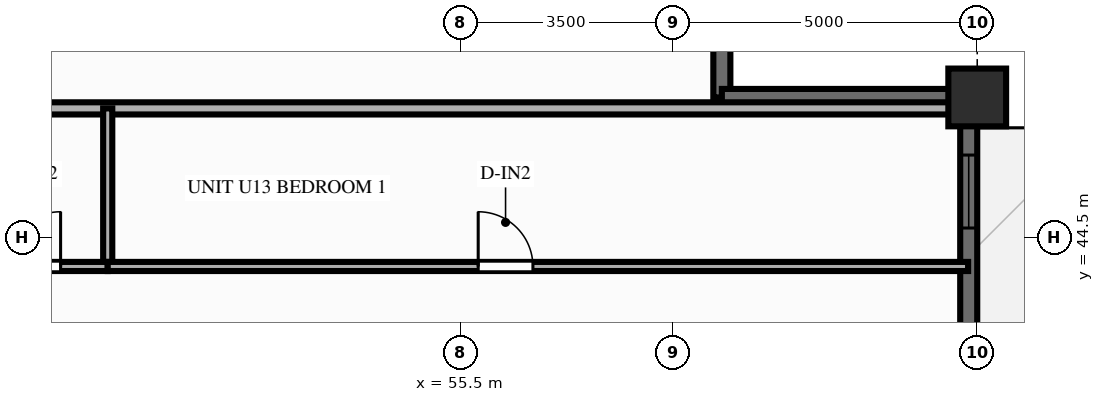
"""IFC4 building model, lengths in metres.
Left out: names, types, materials, properties, quantities, classifications, styles, units other than length and angle.
Written with IfcOpenShell. Run it as: python <this file> out.ifc"""

import sys

from ifc_helpers import new_model, si_unit, direction, frame, frame_2d, origin, origin_2d, place, context, subcontext, project, spatial, rectangle, extrude, source, transform, mapped, element, fill, save


model = new_model("IFC4")
c1 = context("Model", 3, precision=1e-05, world=origin(), true_north=direction((0.0, 1.0)))
c2 = subcontext(c1, "Body", "Model", "MODEL_VIEW")
j1 = project(units=[si_unit("LENGTHUNIT", "METRE"), si_unit("PLANEANGLEUNIT", "RADIAN")], contexts=[c1])
p1 = place(None, origin())
s1 = spatial("IfcSite", under=j1, at=p1, CompositionType="ELEMENT")
p2 = place(p1, origin())
s2 = spatial("IfcBuilding", under=s1, at=p2, CompositionType="ELEMENT")
p3 = place(p2, frame((0.0, 0.0, 110.85)))
s3 = spatial("IfcBuildingStorey", under=s2, at=p3, CompositionType="ELEMENT", Elevation=110.85)
m1 = source(origin(), c2, "Body", "SweptSolid", [
    extrude(rectangle(XDim=0.95, YDim=0.95, at=origin_2d()), origin(), (0.0, 0.0, 1.0), 3.0),
])
p4 = place(p3, frame((64.0, 46.8, 0.0), z_axis=(0.0, 0.0, 1.0), x_axis=(1.0, 0.0, 0.0)))
e1 = element("IfcColumn", 1, at=p4, inside=s3, PredefinedType="COLUMN", context=c2, shape_type="MappedRepresentation", body=[
    mapped(m1, transform((0.0, 0.0, 0.0), scale=1.0)),
])
p5 = place(p3, frame((63.86, 7.2, 0.0), z_axis=(0.0, 0.0, 1.0), x_axis=(0.0, 1.0, 0.0)))
e2 = element("IfcWall", 2, at=p5, inside=s3, PredefinedType="SOLIDWALL", context=c2, shape_type="SweptSolid", body=[
    extrude(rectangle(XDim=39.6, YDim=0.28, at=frame_2d((19.8, 0.0))), origin(), (0.0, 0.0, 1.0), 2.28),
])
p6 = place(p5, frame((0.945, 0.0, 0.25)))
e3 = element("IfcOpeningElement", 3, at=p6, cuts=e2, PredefinedType="OPENING", context=c2, shape_type="SweptSolid", body=[
    extrude(rectangle(XDim=1.2, YDim=1.5, at=frame_2d((0.6, 0.75))), frame((0.0, 0.152, 0.0), z_axis=(0.0, -1.0, 0.0), x_axis=(1.0, 0.0, 0.0)), (0.0, 0.0, 1.0), 0.304),
])
p7 = place(p5, frame((4.213, 0.0, 0.25)))
e4 = element("IfcOpeningElement", 4, at=p7, cuts=e2, PredefinedType="OPENING", context=c2, shape_type="SweptSolid", body=[
    extrude(rectangle(XDim=1.2, YDim=1.5, at=frame_2d((0.6, 0.75))), frame((0.0, 0.152, 0.0), z_axis=(0.0, -1.0, 0.0), x_axis=(1.0, 0.0, 0.0)), (0.0, 0.0, 1.0), 0.304),
])
p8 = place(p5, frame((7.55, 0.0, 0.25)))
e5 = element("IfcOpeningElement", 5, at=p8, cuts=e2, PredefinedType="OPENING", context=c2, shape_type="SweptSolid", body=[
    extrude(rectangle(XDim=1.2, YDim=1.5, at=frame_2d((0.6, 0.75))), frame((0.0, 0.152, 0.0), z_axis=(0.0, -1.0, 0.0), x_axis=(1.0, 0.0, 0.0)), (0.0, 0.0, 1.0), 0.304),
])
p9 = place(p5, frame((13.483, 0.0, 0.25)))
e6 = element("IfcOpeningElement", 6, at=p9, cuts=e2, PredefinedType="OPENING", context=c2, shape_type="SweptSolid", body=[
    extrude(rectangle(XDim=1.2, YDim=1.5, at=frame_2d((0.6, 0.75))), frame((0.0, 0.152, 0.0), z_axis=(0.0, -1.0, 0.0), x_axis=(1.0, 0.0, 0.0)), (0.0, 0.0, 1.0), 0.304),
])
p10 = place(p5, frame((16.82, 0.0, 0.25)))
e7 = element("IfcOpeningElement", 7, at=p10, cuts=e2, PredefinedType="OPENING", context=c2, shape_type="SweptSolid", body=[
    extrude(rectangle(XDim=1.2, YDim=1.5, at=frame_2d((0.6, 0.75))), frame((0.0, 0.152, 0.0), z_axis=(0.0, -1.0, 0.0), x_axis=(1.0, 0.0, 0.0)), (0.0, 0.0, 1.0), 0.304),
])
p11 = place(p5, frame((19.2, 0.0, 0.25)))
e8 = element("IfcOpeningElement", 8, at=p11, cuts=e2, PredefinedType="OPENING", context=c2, shape_type="SweptSolid", body=[
    extrude(rectangle(XDim=1.2, YDim=1.5, at=frame_2d((0.6, 0.75))), frame((0.0, 0.152, 0.0), z_axis=(0.0, -1.0, 0.0), x_axis=(1.0, 0.0, 0.0)), (0.0, 0.0, 1.0), 0.304),
])
p12 = place(p5, frame((21.578, 0.0, 0.25)))
e9 = element("IfcOpeningElement", 9, at=p12, cuts=e2, PredefinedType="OPENING", context=c2, shape_type="SweptSolid", body=[
    extrude(rectangle(XDim=1.2, YDim=1.5, at=frame_2d((0.6, 0.75))), frame((0.0, 0.152, 0.0), z_axis=(0.0, -1.0, 0.0), x_axis=(1.0, 0.0, 0.0)), (0.0, 0.0, 1.0), 0.304),
])
p13 = place(p5, frame((26.313, 0.0, 0.0), z_axis=(0.0, 0.0, 1.0), x_axis=(-1.0, 0.0, 0.0)))
e10 = element("IfcOpeningElement", 10, at=p13, cuts=e2, PredefinedType="OPENING", context=c2, shape_type="SweptSolid", body=[
    extrude(rectangle(XDim=1.6, YDim=2.15, at=frame_2d((0.8, 1.075))), frame((0.0, 0.152, 0.0), z_axis=(0.0, -1.0, 0.0), x_axis=(1.0, 0.0, 0.0)), (0.0, 0.0, 1.0), 0.304),
])
p14 = place(p5, frame((29.305, 0.0, 0.25)))
e11 = element("IfcOpeningElement", 11, at=p14, cuts=e2, PredefinedType="OPENING", context=c2, shape_type="SweptSolid", body=[
    extrude(rectangle(XDim=0.7, YDim=1.5, at=frame_2d((0.35, 0.75))), frame((0.0, 0.152, 0.0), z_axis=(0.0, -1.0, 0.0), x_axis=(1.0, 0.0, 0.0)), (0.0, 0.0, 1.0), 0.304),
])
p15 = place(p5, frame((30.848, 0.0, 0.25)))
e12 = element("IfcOpeningElement", 12, at=p15, cuts=e2, PredefinedType="OPENING", context=c2, shape_type="SweptSolid", body=[
    extrude(rectangle(XDim=1.2, YDim=1.5, at=frame_2d((0.6, 0.75))), frame((0.0, 0.152, 0.0), z_axis=(0.0, -1.0, 0.0), x_axis=(1.0, 0.0, 0.0)), (0.0, 0.0, 1.0), 0.304),
])
p16 = place(p5, frame((34.183, 0.0, 0.25)))
e13 = element("IfcOpeningElement", 13, at=p16, cuts=e2, PredefinedType="OPENING", context=c2, shape_type="SweptSolid", body=[
    extrude(rectangle(XDim=1.2, YDim=1.5, at=frame_2d((0.6, 0.75))), frame((0.0, 0.152, 0.0), z_axis=(0.0, -1.0, 0.0), x_axis=(1.0, 0.0, 0.0)), (0.0, 0.0, 1.0), 0.304),
])
p17 = place(p5, frame((37.452, 0.0, 0.25)))
e14 = element("IfcOpeningElement", 14, at=p17, cuts=e2, PredefinedType="OPENING", context=c2, shape_type="SweptSolid", body=[
    extrude(rectangle(XDim=1.2, YDim=1.5, at=frame_2d((0.6, 0.75))), frame((0.0, 0.152, 0.0), z_axis=(0.0, -1.0, 0.0), x_axis=(1.0, 0.0, 0.0)), (0.0, 0.0, 1.0), 0.304),
])
for number, where, z_axis, x_axis in (
    (15, (59.8, 46.8, 0.0), (0.0, 0.0, 1.0), (0.0, 1.0, 0.0)),
    (16, (59.8, 46.8, 0.0), (0.0, 0.0, 1.0), (1.0, 0.0, 0.0)),
):
    element("IfcWall", number, at=place(p3, frame(where, z_axis=z_axis, x_axis=x_axis)), inside=s3, PredefinedType="SOLIDWALL", context=c2, shape_type="SweptSolid", body=[
        extrude(rectangle(XDim=4.12, YDim=0.28, at=frame_2d((2.06, 0.0))), origin(), (0.0, 0.0, 1.0), 2.28),
    ])
p18 = place(p3, frame((47.25, 46.62, 0.0), z_axis=(0.0, 0.0, 1.0), x_axis=(1.0, 0.0, 0.0)))
e17 = element("IfcWall", 17, at=p18, inside=s3, PredefinedType="PARTITIONING", context=c2, shape_type="SweptSolid", body=[
    extrude(rectangle(XDim=16.6, YDim=0.2, at=frame_2d((8.3, 0.0))), origin(), (0.0, 0.0, 1.0), 2.79),
])
p19 = place(p3, frame((49.7, 44.02, 0.0), z_axis=(0.0, 0.0, 1.0), x_axis=(0.0, 1.0, 0.0)))
e18 = element("IfcWall", 18, at=p19, inside=s3, PredefinedType="PARTITIONING", context=c2, shape_type="SweptSolid", body=[
    extrude(rectangle(XDim=2.6, YDim=0.15, at=frame_2d((1.3, 0.0))), origin(), (0.0, 0.0, 1.0), 2.79),
])
p20 = place(p3, frame((47.25, 44.02, 0.0), z_axis=(0.0, 0.0, 1.0), x_axis=(1.0, 0.0, 0.0)))
e19 = element("IfcWall", 19, at=p20, inside=s3, PredefinedType="PARTITIONING", context=c2, shape_type="SweptSolid", body=[
    extrude(rectangle(XDim=2.45, YDim=0.15, at=frame_2d((1.225, 0.0))), origin(), (0.0, 0.0, 1.0), 2.79),
])
p21 = place(p20, frame((0.775, 0.0, 0.0)))
e20 = element("IfcOpeningElement", 20, at=p21, cuts=e19, PredefinedType="OPENING", context=c2, shape_type="SweptSolid", body=[
    extrude(rectangle(XDim=0.9, YDim=2.1, at=frame_2d((0.45, 1.05))), frame((0.0, 0.087, 0.0), z_axis=(0.0, -1.0, 0.0), x_axis=(1.0, 0.0, 0.0)), (0.0, 0.0, 1.0), 0.174),
])
p22 = place(p3, frame((49.7, 44.02, 0.0), z_axis=(0.0, 0.0, 1.0), x_axis=(1.0, 0.0, 0.0)))
e21 = element("IfcWall", 21, at=p22, inside=s3, PredefinedType="PARTITIONING", context=c2, shape_type="SweptSolid", body=[
    extrude(rectangle(XDim=14.15, YDim=0.15, at=frame_2d((7.075, 0.0))), origin(), (0.0, 0.0, 1.0), 2.79),
])
p23 = place(p22, frame((6.093, 0.0, 0.0)))
e22 = element("IfcOpeningElement", 22, at=p23, cuts=e21, PredefinedType="OPENING", context=c2, shape_type="SweptSolid", body=[
    extrude(rectangle(XDim=0.9, YDim=2.1, at=frame_2d((0.45, 1.05))), frame((0.0, 0.087, 0.0), z_axis=(0.0, -1.0, 0.0), x_axis=(1.0, 0.0, 0.0)), (0.0, 0.0, 1.0), 0.174),
])
m2 = source(origin(), c2, "Body", "SweptSolid", [
    extrude(rectangle(XDim=1.2, YDim=1.5, at=frame_2d((0.6, 0.75))), frame((0.0, 0.03, 0.0), z_axis=(0.0, -1.0, 0.0), x_axis=(1.0, 0.0, 0.0)), (0.0, 0.0, 1.0), 0.06),
])
p24 = place(p17, origin())
e23 = element("IfcWindow", 23, at=p24, inside=s3, PartitioningType="SINGLE_PANEL", PredefinedType="WINDOW", context=c2, shape_type="MappedRepresentation", body=[
    mapped(m2, transform((0.0, 0.0, 0.0), scale=1.0)),
])
fill(e14, e23)
m3 = source(origin(), c2, "Body", "SweptSolid", [
    extrude(rectangle(XDim=0.9, YDim=2.1, at=frame_2d((0.45, 1.05))), frame((0.0, 0.025, 0.0), z_axis=(0.0, -1.0, 0.0), x_axis=(1.0, 0.0, 0.0)), (0.0, 0.0, 1.0), 0.05),
])
p25 = place(p21, origin())
e24 = element("IfcDoor", 24, at=p25, inside=s3, OperationType="SINGLE_SWING_RIGHT", PredefinedType="DOOR", context=c2, shape_type="MappedRepresentation", body=[
    mapped(m3, transform((0.0, 0.0, 0.0), scale=1.0)),
])
fill(e20, e24)
p26 = place(p23, origin())
e25 = element("IfcDoor", 25, at=p26, inside=s3, OperationType="SINGLE_SWING_LEFT", PredefinedType="DOOR", context=c2, shape_type="MappedRepresentation", body=[
    mapped(m3, transform((0.0, 0.0, 0.0), scale=1.0)),
])
fill(e22, e25)
save(model, sys.argv[1])
